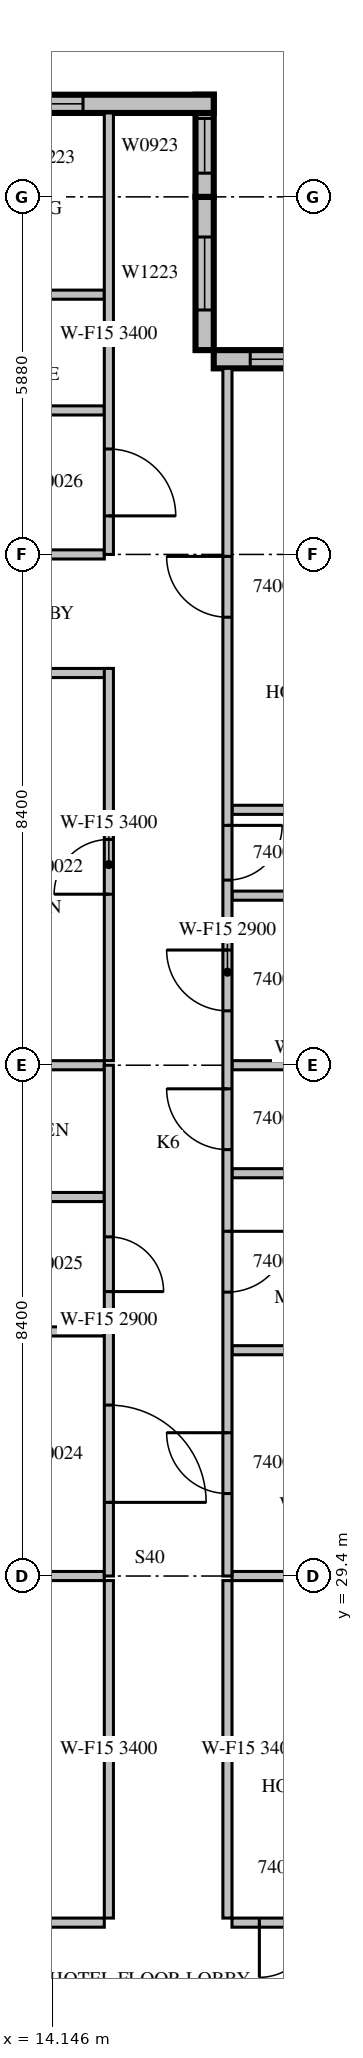
"""IFC4 building model, lengths in metres.
Left out: names, types, materials, properties, quantities, classifications, styles, units other than length and angle.
Written with IfcOpenShell. Run it as: python <this file> out.ifc"""

import sys

from ifc_helpers import new_model, si_unit, direction, frame, frame_2d, origin, place, context, subcontext, project, spatial, rectangle, extrude, source, transform, mapped, element, fill, save


model = new_model("IFC4")
c1 = context("Model", 3, precision=1e-05, world=origin(), true_north=direction((0.0, 1.0)))
c2 = subcontext(c1, "Body", "Model", "MODEL_VIEW")
j1 = project(units=[si_unit("LENGTHUNIT", "METRE"), si_unit("PLANEANGLEUNIT", "RADIAN")], contexts=[c1])
p1 = place(None, origin())
s1 = spatial("IfcSite", under=j1, at=p1, CompositionType="ELEMENT")
p2 = place(p1, origin())
s2 = spatial("IfcBuilding", under=s1, at=p2, CompositionType="ELEMENT")
p3 = place(p2, frame((0.0, 0.0, 185.4)))
s3 = spatial("IfcBuildingStorey", under=s2, at=p3, CompositionType="ELEMENT", Elevation=185.4)
m1 = source(origin(), c2, "Body", "SweptSolid", [
    extrude(rectangle(XDim=4.2, YDim=0.3, at=frame_2d((2.1, 0.0))), origin(), (0.0, 0.0, 1.0), 3.4),
])
p4 = place(p3, frame((21.0, 49.41, 0.0), z_axis=(0.0, 0.0, 1.0), x_axis=(-1.0, 0.0, 0.0)))
e1 = element("IfcWall", 1, at=p4, inside=s3, PredefinedType="STANDARD", context=c2, shape_type="MappedRepresentation", body=[
    mapped(m1, transform((0.0, 0.0, 0.0), scale=1.0)),
])
m2 = source(origin(), c2, "Body", "SweptSolid", [
    extrude(rectangle(XDim=3.0, YDim=2.3, at=frame_2d((1.5, 1.15))), frame((0.0, 0.16, 0.0), z_axis=(0.0, -1.0, 0.0), x_axis=(1.0, 0.0, 0.0)), (0.0, 0.0, 1.0), 0.32),
])
p5 = place(p4, frame((0.6, 0.0, 0.6)))
e2 = element("IfcOpeningElement", 2, at=p5, cuts=e1, PredefinedType="OPENING", context=c2, shape_type="MappedRepresentation", body=[
    mapped(m2, transform((0.0, 0.0, 0.0), scale=1.0)),
])
m3 = source(origin(), c2, "Body", "SweptSolid", [
    extrude(rectangle(XDim=2.52, YDim=0.3, at=frame_2d((1.26, 0.0))), origin(), (0.0, 0.0, 1.0), 3.4),
])
p6 = place(p3, frame((16.65, 49.56, 0.0), z_axis=(0.0, 0.0, 1.0), x_axis=(0.0, 1.0, 0.0)))
e3 = element("IfcWall", 3, at=p6, inside=s3, PredefinedType="STANDARD", context=c2, shape_type="MappedRepresentation", body=[
    mapped(m3, transform((0.0, 0.0, 0.0), scale=1.0)),
])
m4 = source(origin(), c2, "Body", "SweptSolid", [
    extrude(rectangle(XDim=1.2, YDim=2.3, at=frame_2d((0.6, 1.15))), frame((0.0, 0.16, 0.0), z_axis=(0.0, -1.0, 0.0), x_axis=(1.0, 0.0, 0.0)), (0.0, 0.0, 1.0), 0.32),
])
p7 = place(p6, frame((0.66, 0.0, 0.6)))
e4 = element("IfcOpeningElement", 4, at=p7, cuts=e3, PredefinedType="OPENING", context=c2, shape_type="MappedRepresentation", body=[
    mapped(m4, transform((0.0, 0.0, 0.0), scale=1.0)),
])
m5 = source(origin(), c2, "Body", "SweptSolid", [
    extrude(rectangle(XDim=1.68, YDim=0.3, at=frame_2d((0.84, 0.0))), origin(), (0.0, 0.0, 1.0), 3.4),
])
p8 = place(p3, frame((16.65, 52.08, 0.0), z_axis=(0.0, 0.0, 1.0), x_axis=(0.0, 1.0, 0.0)))
e5 = element("IfcWall", 5, at=p8, inside=s3, PredefinedType="STANDARD", context=c2, shape_type="MappedRepresentation", body=[
    mapped(m5, transform((0.0, 0.0, 0.0), scale=1.0)),
])
m6 = source(origin(), c2, "Body", "SweptSolid", [
    extrude(rectangle(XDim=0.9, YDim=2.3, at=frame_2d((0.45, 1.15))), frame((0.0, 0.16, 0.0), z_axis=(0.0, -1.0, 0.0), x_axis=(1.0, 0.0, 0.0)), (0.0, 0.0, 1.0), 0.32),
])
p9 = place(p8, frame((0.39, 0.0, 0.6)))
e6 = element("IfcOpeningElement", 6, at=p9, cuts=e5, PredefinedType="OPENING", context=c2, shape_type="MappedRepresentation", body=[
    mapped(m6, transform((0.0, 0.0, 0.0), scale=1.0)),
])
m7 = source(origin(), c2, "Body", "SweptSolid", [
    extrude(rectangle(XDim=10.5, YDim=0.3, at=frame_2d((5.25, 0.0))), origin(), (0.0, 0.0, 1.0), 3.4),
])
p10 = place(p3, frame((16.8, 53.61, 0.0), z_axis=(0.0, 0.0, 1.0), x_axis=(-1.0, 0.0, 0.0)))
e7 = element("IfcWall", 7, at=p10, inside=s3, PredefinedType="STANDARD", context=c2, shape_type="MappedRepresentation", body=[
    mapped(m7, transform((0.0, 0.0, 0.0), scale=1.0)),
])
p11 = place(p10, frame((2.15, 0.0, 0.6)))
e8 = element("IfcOpeningElement", 8, at=p11, cuts=e7, PredefinedType="OPENING", context=c2, shape_type="MappedRepresentation", body=[
    mapped(m4, transform((0.0, 0.0, 0.0), scale=1.0)),
])
m8 = source(origin(), c2, "Body", "SweptSolid", [
    extrude(rectangle(XDim=1.8, YDim=2.3, at=frame_2d((0.9, 1.15))), frame((0.0, 0.16, 0.0), z_axis=(0.0, -1.0, 0.0), x_axis=(1.0, 0.0, 0.0)), (0.0, 0.0, 1.0), 0.32),
])
p12 = place(p10, frame((8.025, 0.0, 0.6)))
e9 = element("IfcOpeningElement", 9, at=p12, cuts=e7, PredefinedType="OPENING", context=c2, shape_type="MappedRepresentation", body=[
    mapped(m8, transform((0.0, 0.0, 0.0), scale=1.0)),
])
p13 = place(p3, frame((10.705, 23.7, 0.0), z_axis=(0.0, 0.0, 1.0), x_axis=(1.0, 0.0, 0.0)))
e10 = element("IfcWall", 10, at=p13, inside=s3, PredefinedType="PARTITIONING", context=c2, shape_type="SweptSolid", body=[
    extrude(rectangle(XDim=4.295, YDim=0.15, at=frame_2d((2.147, 0.0))), origin(), (0.0, 0.0, 1.0), 3.4),
])
m9 = source(origin(), c2, "Body", "SweptSolid", [
    extrude(rectangle(XDim=0.9, YDim=2.1, at=frame_2d((0.45, 1.05))), frame((0.0, 0.085, 0.0), z_axis=(0.0, -1.0, 0.0), x_axis=(1.0, 0.0, 0.0)), (0.0, 0.0, 1.0), 0.17),
])
p14 = place(p13, frame((2.283, 0.0, 0.0)))
e11 = element("IfcOpeningElement", 11, at=p14, cuts=e10, PredefinedType="OPENING", context=c2, shape_type="MappedRepresentation", body=[
    mapped(m9, transform((0.0, 0.0, 0.0), scale=1.0)),
])
m10 = source(origin(), c2, "Body", "SweptSolid", [
    extrude(rectangle(XDim=3.6, YDim=0.15, at=frame_2d((1.8, 0.0))), origin(), (0.0, 0.0, 1.0), 3.4),
])
p15 = place(p3, frame((17.1, 23.7, 0.0), z_axis=(0.0, 0.0, 1.0), x_axis=(1.0, 0.0, 0.0)))
e12 = element("IfcWall", 12, at=p15, inside=s3, PredefinedType="PARTITIONING", context=c2, shape_type="MappedRepresentation", body=[
    mapped(m10, transform((0.0, 0.0, 0.0), scale=1.0)),
])
p16 = place(p15, frame((0.45, 0.0, 0.0)))
e13 = element("IfcOpeningElement", 13, at=p16, cuts=e12, PredefinedType="OPENING", context=c2, shape_type="MappedRepresentation", body=[
    mapped(m9, transform((0.0, 0.0, 0.0), scale=1.0)),
])
m11 = source(origin(), c2, "Body", "SweptSolid", [
    extrude(rectangle(XDim=5.55, YDim=0.15, at=frame_2d((2.775, 0.0))), origin(), (0.0, 0.0, 1.0), 3.4),
])
for number, where, z_axis, x_axis in (
    (14, (15.075, 23.775, 0.0), (0.0, 0.0, 1.0), (0.0, 1.0, 0.0)),
    (15, (17.025, 29.325, 0.0), (0.0, 0.0, 1.0), (0.0, -1.0, 0.0)),
):
    element("IfcWall", number, at=place(p3, frame(where, z_axis=z_axis, x_axis=x_axis)), inside=s3, PredefinedType="PARTITIONING", context=c2, shape_type="MappedRepresentation", body=[
        mapped(m11, transform((0.0, 0.0, 0.0), scale=1.0)),
    ])
m12 = source(origin(), c2, "Body", "SweptSolid", [
    extrude(rectangle(XDim=4.051, YDim=0.15, at=frame_2d((2.026, 0.0))), origin(), (0.0, 0.0, 1.0), 3.4),
])
p17 = place(p3, frame((15.0, 29.4, 0.0), z_axis=(0.0, 0.0, 1.0), x_axis=(-1.0, 0.0, 0.0)))
e16 = element("IfcWall", 16, at=p17, inside=s3, PredefinedType="PARTITIONING", context=c2, shape_type="MappedRepresentation", body=[
    mapped(m12, transform((0.0, 0.0, 0.0), scale=1.0)),
])
m13 = source(origin(), c2, "Body", "SweptSolid", [
    extrude(rectangle(XDim=3.001, YDim=0.15, at=frame_2d((1.5, 0.0))), origin(), (0.0, 0.0, 1.0), 3.4),
])
p18 = place(p3, frame((20.101, 29.4, 0.0), z_axis=(0.0, 0.0, 1.0), x_axis=(-1.0, 0.0, 0.0)))
e17 = element("IfcWall", 17, at=p18, inside=s3, PredefinedType="PARTITIONING", context=c2, shape_type="MappedRepresentation", body=[
    mapped(m13, transform((0.0, 0.0, 0.0), scale=1.0)),
])
p19 = place(p3, frame((15.075, 44.25, 0.0), z_axis=(0.0, 0.0, 1.0), x_axis=(-1.0, 0.0, 0.0)))
e18 = element("IfcWall", 18, at=p19, inside=s3, PredefinedType="PARTITIONING", context=c2, shape_type="SweptSolid", body=[
    extrude(rectangle(XDim=3.175, YDim=0.15, at=frame_2d((1.587, 0.0))), origin(), (0.0, 0.0, 1.0), 3.4),
])
m14 = source(origin(), c2, "Body", "SweptSolid", [
    extrude(rectangle(XDim=6.45, YDim=0.15, at=frame_2d((3.225, 0.0))), origin(), (0.0, 0.0, 1.0), 3.4),
])
p20 = place(p3, frame((15.075, 37.875, 0.0), z_axis=(0.0, 0.0, 1.0), x_axis=(0.0, 1.0, 0.0)))
e19 = element("IfcWall", 19, at=p20, inside=s3, PredefinedType="PARTITIONING", context=c2, shape_type="MappedRepresentation", body=[
    mapped(m14, transform((0.0, 0.0, 0.0), scale=1.0)),
])
p21 = place(p20, frame((2.737, 0.0, 0.0)))
e20 = element("IfcOpeningElement", 20, at=p21, cuts=e19, PredefinedType="OPENING", context=c2, shape_type="MappedRepresentation", body=[
    mapped(m9, transform((0.0, 0.0, 0.0), scale=1.0)),
])
m15 = source(origin(), c2, "Body", "SweptSolid", [
    extrude(rectangle(XDim=4.295, YDim=0.15, at=frame_2d((2.147, 0.0))), origin(), (0.0, 0.0, 1.0), 3.4),
])
p22 = place(p3, frame((15.0, 33.422, 0.0), z_axis=(0.0, 0.0, 1.0), x_axis=(-1.0, 0.0, 0.0)))
e21 = element("IfcWall", 21, at=p22, inside=s3, PredefinedType="PARTITIONING", context=c2, shape_type="MappedRepresentation", body=[
    mapped(m15, transform((0.0, 0.0, 0.0), scale=1.0)),
])
p23 = place(p3, frame((15.0, 35.633, 0.0), z_axis=(0.0, 0.0, 1.0), x_axis=(-1.0, 0.0, 0.0)))
e22 = element("IfcWall", 22, at=p23, inside=s3, PredefinedType="PARTITIONING", context=c2, shape_type="MappedRepresentation", body=[
    mapped(m15, transform((0.0, 0.0, 0.0), scale=1.0)),
])
p24 = place(p23, frame((1.698, 0.0, 0.0)))
e23 = element("IfcOpeningElement", 23, at=p24, cuts=e22, PredefinedType="OPENING", context=c2, shape_type="MappedRepresentation", body=[
    mapped(m9, transform((0.0, 0.0, 0.0), scale=1.0)),
])
p25 = place(p3, frame((15.0, 37.8, 0.0), z_axis=(0.0, 0.0, 1.0), x_axis=(-1.0, 0.0, 0.0)))
e24 = element("IfcWall", 24, at=p25, inside=s3, PredefinedType="PARTITIONING", context=c2, shape_type="MappedRepresentation", body=[
    mapped(m12, transform((0.0, 0.0, 0.0), scale=1.0)),
])
m16 = source(origin(), c2, "Body", "SweptSolid", [
    extrude(rectangle(XDim=3.9, YDim=0.15, at=frame_2d((1.95, 0.0))), origin(), (0.0, 0.0, 1.0), 3.4),
])
for number, where, z_axis, x_axis in (
    (25, (15.0, 48.568, 0.0), (0.0, 0.0, 1.0), (-1.0, 0.0, 0.0)),
    (26, (15.0, 50.472, 0.0), (0.0, 0.0, 1.0), (-1.0, 0.0, 0.0)),
    (27, (15.0, 46.2, 0.0), (0.0, 0.0, 1.0), (-1.0, 0.0, 0.0)),
):
    element("IfcWall", number, at=place(p3, frame(where, z_axis=z_axis, x_axis=x_axis)), inside=s3, PredefinedType="PARTITIONING", context=c2, shape_type="MappedRepresentation", body=[
        mapped(m16, transform((0.0, 0.0, 0.0), scale=1.0)),
    ])
p26 = place(p3, frame((17.1, 33.113, 0.0), z_axis=(0.0, 0.0, 1.0), x_axis=(1.0, 0.0, 0.0)))
e28 = element("IfcWall", 28, at=p26, inside=s3, PredefinedType="PARTITIONING", context=c2, shape_type="SweptSolid", body=[
    extrude(rectangle(XDim=3.6, YDim=0.15, at=frame_2d((1.8, 0.0))), origin(), (0.0, 0.0, 1.0), 2.4),
])
m17 = source(origin(), c2, "Body", "SweptSolid", [
    extrude(rectangle(XDim=3.6, YDim=0.15, at=frame_2d((1.8, 0.0))), origin(), (0.0, 0.0, 1.0), 2.4),
])
p27 = place(p3, frame((17.1, 36.024, 0.0), z_axis=(0.0, 0.0, 1.0), x_axis=(1.0, 0.0, 0.0)))
e29 = element("IfcWall", 29, at=p27, inside=s3, PredefinedType="PARTITIONING", context=c2, shape_type="MappedRepresentation", body=[
    mapped(m17, transform((0.0, 0.0, 0.0), scale=1.0)),
])
p28 = place(p3, frame((17.1, 40.589, 0.0), z_axis=(0.0, 0.0, 1.0), x_axis=(1.0, 0.0, 0.0)))
e30 = element("IfcWall", 30, at=p28, inside=s3, PredefinedType="PARTITIONING", context=c2, shape_type="MappedRepresentation", body=[
    mapped(m10, transform((0.0, 0.0, 0.0), scale=1.0)),
])
p29 = place(p3, frame((20.101, 37.8, 0.0), z_axis=(0.0, 0.0, 1.0), x_axis=(-1.0, 0.0, 0.0)))
e31 = element("IfcWall", 31, at=p29, inside=s3, PredefinedType="PARTITIONING", context=c2, shape_type="MappedRepresentation", body=[
    mapped(m13, transform((0.0, 0.0, 0.0), scale=1.0)),
])
p30 = place(p3, frame((20.7, 42.0, 0.0), z_axis=(0.0, 0.0, 1.0), x_axis=(-1.0, 0.0, 0.0)))
e32 = element("IfcWall", 32, at=p30, inside=s3, PredefinedType="PARTITIONING", context=c2, shape_type="MappedRepresentation", body=[
    mapped(m10, transform((0.0, 0.0, 0.0), scale=1.0)),
])
p31 = place(p3, frame((15.075, 29.4, 0.0), z_axis=(0.0, 0.0, 1.0), x_axis=(0.0, 1.0, 0.0)))
e33 = element("IfcWall", 33, at=p31, inside=s3, PredefinedType="PARTITIONING", context=c2, shape_type="SweptSolid", body=[
    extrude(rectangle(XDim=8.4, YDim=0.15, at=frame_2d((4.2, 0.0))), origin(), (0.0, 0.0, 1.0), 2.9),
])
m18 = source(origin(), c2, "Body", "SweptSolid", [
    extrude(rectangle(XDim=1.6, YDim=2.1, at=frame_2d((0.8, 1.05))), frame((0.0, 0.085, 0.0), z_axis=(0.0, -1.0, 0.0), x_axis=(1.0, 0.0, 0.0)), (0.0, 0.0, 1.0), 0.17),
])
p32 = place(p31, frame((1.211, 0.0, 0.0)))
e34 = element("IfcOpeningElement", 34, at=p32, cuts=e33, PredefinedType="OPENING", context=c2, shape_type="MappedRepresentation", body=[
    mapped(m18, transform((0.0, 0.0, 0.0), scale=1.0)),
])
p33 = place(p31, frame((4.678, 0.0, 0.0)))
e35 = element("IfcOpeningElement", 35, at=p33, cuts=e33, PredefinedType="OPENING", context=c2, shape_type="MappedRepresentation", body=[
    mapped(m9, transform((0.0, 0.0, 0.0), scale=1.0)),
])
m19 = source(origin(), c2, "Body", "SweptSolid", [
    extrude(rectangle(XDim=7.26, YDim=0.15, at=frame_2d((3.63, 0.0))), origin(), (0.0, 0.0, 1.0), 3.4),
])
p34 = place(p3, frame((15.075, 46.2, 0.0), z_axis=(0.0, 0.0, 1.0), x_axis=(0.0, 1.0, 0.0)))
e36 = element("IfcWall", 36, at=p34, inside=s3, PredefinedType="PARTITIONING", context=c2, shape_type="MappedRepresentation", body=[
    mapped(m19, transform((0.0, 0.0, 0.0), scale=1.0)),
])
m20 = source(origin(), c2, "Body", "SweptSolid", [
    extrude(rectangle(XDim=1.1, YDim=2.1, at=frame_2d((0.55, 1.05))), frame((0.0, 0.085, 0.0), z_axis=(0.0, -1.0, 0.0), x_axis=(1.0, 0.0, 0.0)), (0.0, 0.0, 1.0), 0.17),
])
p35 = place(p34, frame((0.634, 0.0, 0.0)))
e37 = element("IfcOpeningElement", 37, at=p35, cuts=e36, PredefinedType="OPENING", context=c2, shape_type="MappedRepresentation", body=[
    mapped(m20, transform((0.0, 0.0, 0.0), scale=1.0)),
])
p36 = place(p3, frame((17.025, 49.26, 0.0), z_axis=(0.0, 0.0, 1.0), x_axis=(0.0, -1.0, 0.0)))
e38 = element("IfcWall", 38, at=p36, inside=s3, PredefinedType="PARTITIONING", context=c2, shape_type="SweptSolid", body=[
    extrude(rectangle(XDim=19.86, YDim=0.15, at=frame_2d((9.93, 0.0))), origin(), (0.0, 0.0, 1.0), 2.9),
])
m21 = source(origin(), c2, "Body", "SweptSolid", [
    extrude(rectangle(XDim=1.0, YDim=2.1, at=frame_2d((0.5, 1.05))), frame((0.0, 0.085, 0.0), z_axis=(0.0, -1.0, 0.0), x_axis=(1.0, 0.0, 0.0)), (0.0, 0.0, 1.0), 0.17),
])
p37 = place(p36, frame((17.503, 0.0, 0.0)))
e39 = element("IfcOpeningElement", 39, at=p37, cuts=e38, PredefinedType="OPENING", context=c2, shape_type="MappedRepresentation", body=[
    mapped(m21, transform((0.0, 0.0, 0.0), scale=1.0)),
])
p38 = place(p36, frame((14.191, 0.0, 0.0)))
e40 = element("IfcOpeningElement", 40, at=p38, cuts=e38, PredefinedType="OPENING", context=c2, shape_type="MappedRepresentation", body=[
    mapped(m21, transform((0.0, 0.0, 0.0), scale=1.0)),
])
p39 = place(p36, frame((11.848, 0.0, 0.0)))
e41 = element("IfcOpeningElement", 41, at=p39, cuts=e38, PredefinedType="OPENING", context=c2, shape_type="MappedRepresentation", body=[
    mapped(m21, transform((0.0, 0.0, 0.0), scale=1.0)),
])
p40 = place(p36, frame((9.566, 0.0, 0.0)))
e42 = element("IfcOpeningElement", 42, at=p40, cuts=e38, PredefinedType="OPENING", context=c2, shape_type="MappedRepresentation", body=[
    mapped(m21, transform((0.0, 0.0, 0.0), scale=1.0)),
])
p41 = place(p36, frame((7.516, 0.0, 0.0)))
e43 = element("IfcOpeningElement", 43, at=p41, cuts=e38, PredefinedType="OPENING", context=c2, shape_type="MappedRepresentation", body=[
    mapped(m9, transform((0.0, 0.0, 0.0), scale=1.0)),
])
p42 = place(p36, frame((3.092, 0.0, 0.0)))
e44 = element("IfcOpeningElement", 44, at=p42, cuts=e38, PredefinedType="OPENING", context=c2, shape_type="MappedRepresentation", body=[
    mapped(m21, transform((0.0, 0.0, 0.0), scale=1.0)),
])
m22 = source(origin(), c2, "Body", "SweptSolid", [
    extrude(rectangle(XDim=3.0, YDim=2.3, at=frame_2d((1.5, 1.15))), frame((0.0, 0.03, 0.0), z_axis=(0.0, -1.0, 0.0), x_axis=(1.0, 0.0, 0.0)), (0.0, 0.0, 1.0), 0.06),
])
p43 = place(p5, origin())
e45 = element("IfcWindow", 45, at=p43, inside=s3, PartitioningType="SINGLE_PANEL", PredefinedType="WINDOW", context=c2, shape_type="MappedRepresentation", body=[
    mapped(m22, transform((0.0, 0.0, 0.0), scale=1.0)),
])
fill(e2, e45)
m23 = source(origin(), c2, "Body", "SweptSolid", [
    extrude(rectangle(XDim=1.2, YDim=2.3, at=frame_2d((0.6, 1.15))), frame((0.0, 0.03, 0.0), z_axis=(0.0, -1.0, 0.0), x_axis=(1.0, 0.0, 0.0)), (0.0, 0.0, 1.0), 0.06),
])
p44 = place(p7, origin())
e46 = element("IfcWindow", 46, at=p44, inside=s3, PartitioningType="SINGLE_PANEL", PredefinedType="WINDOW", context=c2, shape_type="MappedRepresentation", body=[
    mapped(m23, transform((0.0, 0.0, 0.0), scale=1.0)),
])
fill(e4, e46)
m24 = source(origin(), c2, "Body", "SweptSolid", [
    extrude(rectangle(XDim=0.9, YDim=2.3, at=frame_2d((0.45, 1.15))), frame((0.0, 0.03, 0.0), z_axis=(0.0, -1.0, 0.0), x_axis=(1.0, 0.0, 0.0)), (0.0, 0.0, 1.0), 0.06),
])
p45 = place(p9, origin())
e47 = element("IfcWindow", 47, at=p45, inside=s3, PartitioningType="SINGLE_PANEL", PredefinedType="WINDOW", context=c2, shape_type="MappedRepresentation", body=[
    mapped(m24, transform((0.0, 0.0, 0.0), scale=1.0)),
])
fill(e6, e47)
p46 = place(p11, origin())
e48 = element("IfcWindow", 48, at=p46, inside=s3, PartitioningType="SINGLE_PANEL", PredefinedType="WINDOW", context=c2, shape_type="MappedRepresentation", body=[
    mapped(m23, transform((0.0, 0.0, 0.0), scale=1.0)),
])
fill(e8, e48)
m25 = source(origin(), c2, "Body", "SweptSolid", [
    extrude(rectangle(XDim=0.9, YDim=2.1, at=frame_2d((0.45, 1.05))), frame((0.0, 0.025, 0.0), z_axis=(0.0, -1.0, 0.0), x_axis=(1.0, 0.0, 0.0)), (0.0, 0.0, 1.0), 0.05),
])
p47 = place(p16, origin())
e49 = element("IfcDoor", 49, at=p47, inside=s3, OperationType="SINGLE_SWING_RIGHT", PredefinedType="DOOR", context=c2, shape_type="MappedRepresentation", body=[
    mapped(m25, transform((0.0, 0.0, 0.0), scale=1.0)),
])
fill(e13, e49)
p48 = place(p21, origin())
e50 = element("IfcDoor", 50, at=p48, inside=s3, OperationType="SINGLE_SWING_LEFT", PredefinedType="DOOR", context=c2, shape_type="MappedRepresentation", body=[
    mapped(m25, transform((0.0, 0.0, 0.0), scale=1.0)),
])
fill(e20, e50)
m26 = source(origin(), c2, "Body", "SweptSolid", [
    extrude(rectangle(XDim=1.6, YDim=2.1, at=frame_2d((0.8, 1.05))), frame((0.0, 0.025, 0.0), z_axis=(0.0, -1.0, 0.0), x_axis=(1.0, 0.0, 0.0)), (0.0, 0.0, 1.0), 0.05),
])
p49 = place(p32, origin())
e51 = element("IfcDoor", 51, at=p49, inside=s3, OperationType="SINGLE_SWING_RIGHT", PredefinedType="DOOR", context=c2, shape_type="MappedRepresentation", body=[
    mapped(m26, transform((0.0, 0.0, 0.0), scale=1.0)),
])
fill(e34, e51)
p50 = place(p33, origin())
e52 = element("IfcDoor", 52, at=p50, inside=s3, OperationType="SINGLE_SWING_RIGHT", PredefinedType="DOOR", context=c2, shape_type="MappedRepresentation", body=[
    mapped(m25, transform((0.0, 0.0, 0.0), scale=1.0)),
])
fill(e35, e52)
m27 = source(origin(), c2, "Body", "SweptSolid", [
    extrude(rectangle(XDim=1.1, YDim=2.1, at=frame_2d((0.55, 1.05))), frame((0.0, 0.025, 0.0), z_axis=(0.0, -1.0, 0.0), x_axis=(1.0, 0.0, 0.0)), (0.0, 0.0, 1.0), 0.05),
])
p51 = place(p35, origin())
e53 = element("IfcDoor", 53, at=p51, inside=s3, OperationType="SINGLE_SWING_RIGHT", PredefinedType="DOOR", context=c2, shape_type="MappedRepresentation", body=[
    mapped(m27, transform((0.0, 0.0, 0.0), scale=1.0)),
])
fill(e37, e53)
m28 = source(origin(), c2, "Body", "SweptSolid", [
    extrude(rectangle(XDim=1.0, YDim=2.1, at=frame_2d((0.5, 1.05))), frame((0.0, 0.025, 0.0), z_axis=(0.0, -1.0, 0.0), x_axis=(1.0, 0.0, 0.0)), (0.0, 0.0, 1.0), 0.05),
])
p52 = place(p37, origin())
e54 = element("IfcDoor", 54, at=p52, inside=s3, OperationType="SINGLE_SWING_RIGHT", PredefinedType="DOOR", context=c2, shape_type="MappedRepresentation", body=[
    mapped(m28, transform((0.0, 0.0, 0.0), scale=1.0)),
])
fill(e39, e54)
p53 = place(p38, origin())
e55 = element("IfcDoor", 55, at=p53, inside=s3, OperationType="SINGLE_SWING_LEFT", PredefinedType="DOOR", context=c2, shape_type="MappedRepresentation", body=[
    mapped(m28, transform((0.0, 0.0, 0.0), scale=1.0)),
])
fill(e40, e55)
p54 = place(p39, origin())
e56 = element("IfcDoor", 56, at=p54, inside=s3, OperationType="SINGLE_SWING_RIGHT", PredefinedType="DOOR", context=c2, shape_type="MappedRepresentation", body=[
    mapped(m28, transform((0.0, 0.0, 0.0), scale=1.0)),
])
fill(e41, e56)
p55 = place(p40, origin())
e57 = element("IfcDoor", 57, at=p55, inside=s3, OperationType="SINGLE_SWING_RIGHT", PredefinedType="DOOR", context=c2, shape_type="MappedRepresentation", body=[
    mapped(m28, transform((0.0, 0.0, 0.0), scale=1.0)),
])
fill(e42, e57)
p56 = place(p41, origin())
e58 = element("IfcDoor", 58, at=p56, inside=s3, OperationType="SINGLE_SWING_LEFT", PredefinedType="DOOR", context=c2, shape_type="MappedRepresentation", body=[
    mapped(m25, transform((0.0, 0.0, 0.0), scale=1.0)),
])
fill(e43, e58)
p57 = place(p42, origin())
e59 = element("IfcDoor", 59, at=p57, inside=s3, OperationType="SINGLE_SWING_RIGHT", PredefinedType="DOOR", context=c2, shape_type="MappedRepresentation", body=[
    mapped(m28, transform((0.0, 0.0, 0.0), scale=1.0)),
])
fill(e44, e59)
save(model, sys.argv[1])
